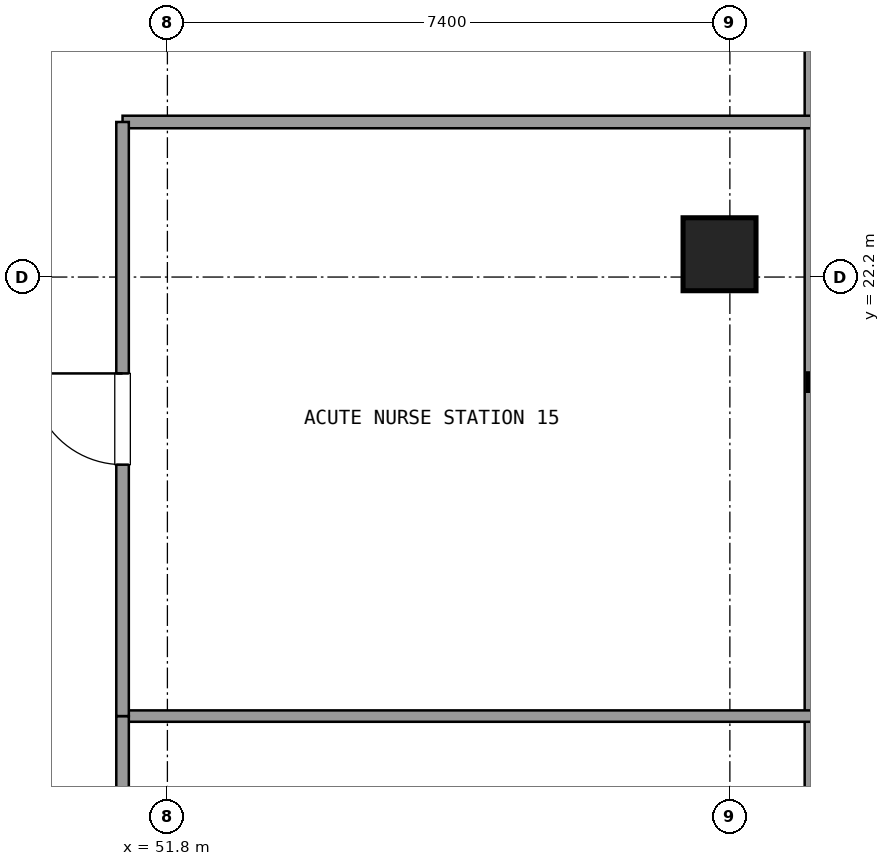
"""IFC4 building model, lengths in metres.
Left out: names, types, materials, properties, quantities, classifications, styles, units other than length and angle.
Written with IfcOpenShell. Run it as: python <this file> out.ifc"""

import sys

from ifc_helpers import new_model, si_unit, direction, frame, frame_2d, origin, origin_2d, place, context, subcontext, project, spatial, rectangle, extrude, element, fill, save


model = new_model("IFC4")
c1 = context("Model", 3, precision=1e-05, world=origin(), true_north=direction((0.0, 1.0)))
c2 = subcontext(c1, "Body", "Model", "MODEL_VIEW")
j1 = project(units=[si_unit("LENGTHUNIT", "METRE"), si_unit("PLANEANGLEUNIT", "RADIAN")], contexts=[c1])
p1 = place(None, origin())
s1 = spatial("IfcSite", under=j1, at=p1, CompositionType="ELEMENT")
p2 = place(p1, origin())
s2 = spatial("IfcBuilding", under=s1, at=p2, CompositionType="ELEMENT")
p3 = place(p2, frame((0.0, 0.0, 138.42)))
s3 = spatial("IfcBuildingStorey", under=s2, at=p3, CompositionType="ELEMENT", Elevation=138.42)
p4 = place(p3, frame((59.064, 22.5, 0.0), z_axis=(0.0, 0.0, 1.0), x_axis=(1.0, 0.0, 0.0)))
e1 = element("IfcColumn", 1, at=p4, inside=s3, PredefinedType="COLUMN", context=c2, shape_type="SweptSolid", body=[
    extrude(rectangle(XDim=0.96, YDim=0.96, at=origin_2d()), origin(), (0.0, 0.0, 1.0), 3.6),
])
p5 = place(p3, frame((60.304, 10.655, 0.0), z_axis=(0.0, 0.0, 1.0), x_axis=(0.0, 1.0, 0.0)))
e2 = element("IfcWall", 2, at=p5, inside=s3, PredefinedType="SOLIDWALL", context=c2, shape_type="SweptSolid", body=[
    extrude(rectangle(XDim=30.49, YDim=0.24, at=frame_2d((15.245, 0.0))), origin(), (0.0, 0.0, 1.0), 0.85),
])
p6 = place(p3, frame((51.21, 24.24, 0.0), z_axis=(0.0, 0.0, 1.0), x_axis=(1.0, 0.0, 0.0)))
e3 = element("IfcWall", 3, at=p6, inside=s3, PredefinedType="PARTITIONING", context=c2, shape_type="SweptSolid", body=[
    extrude(rectangle(XDim=9.074, YDim=0.165, at=frame_2d((4.537, 0.0))), origin(), (0.0, 0.0, 1.0), 2.61),
])
p7 = place(p3, frame((51.21, 16.424, 0.0), z_axis=(0.0, 0.0, 1.0), x_axis=(1.0, 0.0, 0.0)))
e4 = element("IfcWall", 4, at=p7, inside=s3, PredefinedType="PARTITIONING", context=c2, shape_type="SweptSolid", body=[
    extrude(rectangle(XDim=9.074, YDim=0.15, at=frame_2d((4.537, 0.0))), origin(), (0.0, 0.0, 1.0), 2.61),
])
p8 = place(p3, frame((51.21, 4.7, 0.0), z_axis=(0.0, 0.0, 1.0), x_axis=(0.0, 1.0, 0.0)))
e5 = element("IfcWall", 5, at=p8, inside=s3, PredefinedType="PARTITIONING", context=c2, shape_type="SweptSolid", body=[
    extrude(rectangle(XDim=11.724, YDim=0.165, at=frame_2d((5.862, 0.0))), origin(), (0.0, 0.0, 1.0), 2.61),
])
p9 = place(p8, frame((5.262, 0.0, 0.0)))
e6 = element("IfcOpeningElement", 6, at=p9, cuts=e5, PredefinedType="OPENING", context=c2, shape_type="SweptSolid", body=[
    extrude(rectangle(XDim=1.2, YDim=2.15, at=frame_2d((0.6, 1.075))), frame((0.0, 0.093, 0.0), z_axis=(0.0, -1.0, 0.0), x_axis=(1.0, 0.0, 0.0)), (0.0, 0.0, 1.0), 0.185),
])
p10 = place(p3, frame((51.21, 16.424, 0.0), z_axis=(0.0, 0.0, 1.0), x_axis=(0.0, 1.0, 0.0)))
e7 = element("IfcWall", 7, at=p10, inside=s3, PredefinedType="PARTITIONING", context=c2, shape_type="SweptSolid", body=[
    extrude(rectangle(XDim=7.816, YDim=0.165, at=frame_2d((3.908, 0.0))), origin(), (0.0, 0.0, 1.0), 2.61),
])
p11 = place(p10, frame((3.308, 0.0, 0.0)))
e8 = element("IfcOpeningElement", 8, at=p11, cuts=e7, PredefinedType="OPENING", context=c2, shape_type="SweptSolid", body=[
    extrude(rectangle(XDim=1.2, YDim=2.15, at=frame_2d((0.6, 1.075))), frame((0.0, 0.093, 0.0), z_axis=(0.0, -1.0, 0.0), x_axis=(1.0, 0.0, 0.0)), (0.0, 0.0, 1.0), 0.185),
])
p12 = place(p11, origin())
e9 = element("IfcDoor", 9, at=p12, inside=s3, OperationType="SINGLE_SWING_RIGHT", PredefinedType="DOOR", context=c2, shape_type="SweptSolid", body=[
    extrude(rectangle(XDim=1.2, YDim=2.15, at=frame_2d((0.6, 1.075))), frame((0.0, 0.025, 0.0), z_axis=(0.0, -1.0, 0.0), x_axis=(1.0, 0.0, 0.0)), (0.0, 0.0, 1.0), 0.05),
])
fill(e8, e9)
save(model, sys.argv[1])
